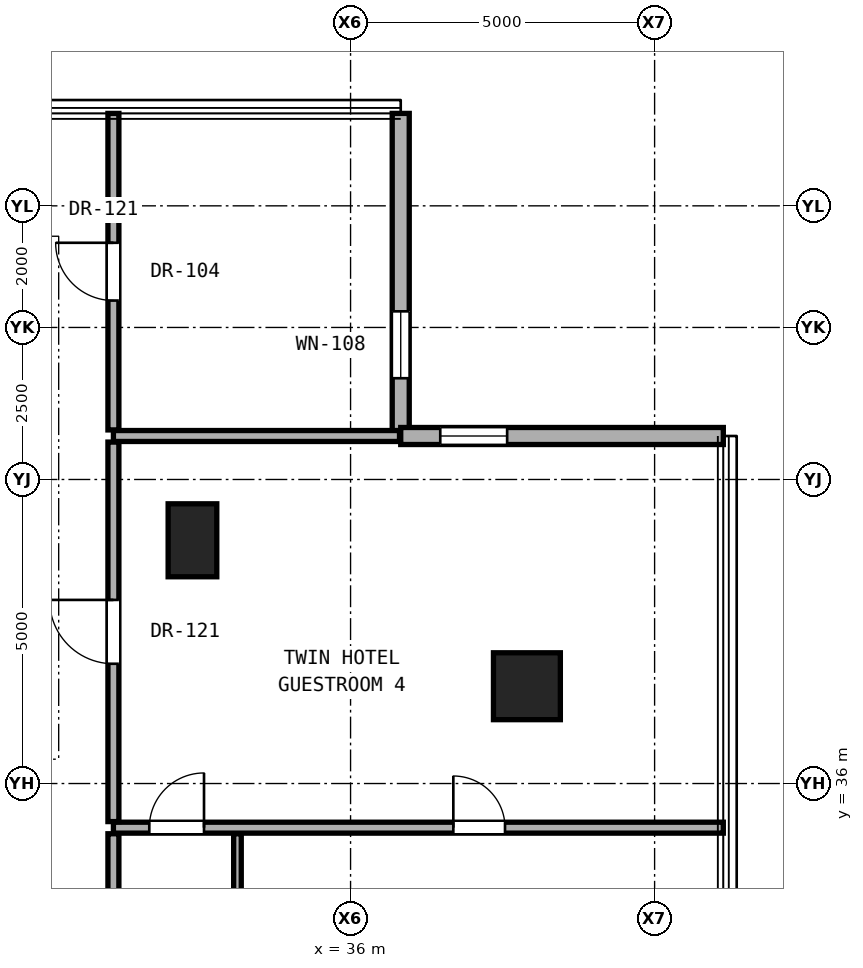
"""IFC4 building model, lengths in metres.
Left out: names, types, materials, properties, quantities, classifications, styles, units other than length and angle.
Written with IfcOpenShell. Run it as: python <this file> out.ifc"""

import sys

from ifc_helpers import new_model, si_unit, direction, frame, frame_2d, origin, origin_2d, place, context, subcontext, project, spatial, rectangle, hollow_rectangle, extrude, element, fill, save


model = new_model("IFC4")
c1 = context("Model", 3, precision=1e-05, world=origin(), true_north=direction((0.0, 1.0)))
c2 = subcontext(c1, "Body", "Model", "MODEL_VIEW")
j1 = project(units=[si_unit("LENGTHUNIT", "METRE"), si_unit("PLANEANGLEUNIT", "RADIAN")], contexts=[c1])
p1 = place(None, origin())
s1 = spatial("IfcSite", under=j1, at=p1, CompositionType="ELEMENT")
p2 = place(p1, origin())
s2 = spatial("IfcBuilding", under=s1, at=p2, CompositionType="ELEMENT")
p3 = place(p2, frame((0.0, 0.0, 104.9)))
s3 = spatial("IfcBuildingStorey", under=s2, at=p3, CompositionType="ELEMENT", Elevation=104.9)
p4 = place(p3, frame((38.9, 37.6, 0.0), z_axis=(0.0, 0.0, 1.0), x_axis=(1.0, 0.0, 0.0)))
e1 = element("IfcColumn", 1, at=p4, inside=s3, PredefinedType="COLUMN", context=c2, shape_type="SweptSolid", body=[
    extrude(hollow_rectangle(XDim=1.1, YDim=1.1, WallThickness=0.06, at=origin_2d()), origin(), (0.0, 0.0, 1.0), 3.3),
])
p5 = place(p3, frame((33.4, 40.0, 0.0), z_axis=(0.0, 0.0, 1.0), x_axis=(1.0, 0.0, 0.0)))
e2 = element("IfcColumn", 2, at=p5, inside=s3, PredefinedType="PILASTER", context=c2, shape_type="SweptSolid", body=[
    extrude(rectangle(XDim=0.8, YDim=1.2, at=origin_2d()), origin(), (0.0, 0.0, 1.0), 3.3),
])
p6 = place(p3, frame((36.825, 41.715, 0.0), z_axis=(0.0, 0.0, 1.0), x_axis=(0.0, 1.0, 0.0)))
e3 = element("IfcWall", 3, at=p6, inside=s3, PredefinedType="SOLIDWALL", context=c2, shape_type="SweptSolid", body=[
    extrude(rectangle(XDim=5.305, YDim=0.28, at=frame_2d((2.652, 0.0))), origin(), (0.0, 0.0, 1.0), 3.06),
])
p7 = place(p6, frame((0.95, 0.0, 0.85)))
e4 = element("IfcOpeningElement", 4, at=p7, cuts=e3, PredefinedType="OPENING", context=c2, shape_type="SweptSolid", body=[
    extrude(rectangle(XDim=1.1, YDim=2.0, at=frame_2d((0.55, 1.0))), frame((0.0, 0.15, 0.0), z_axis=(0.0, -1.0, 0.0), x_axis=(1.0, 0.0, 0.0)), (0.0, 0.0, 1.0), 0.3),
])
p8 = place(p3, frame((42.13, 41.715, 0.0), z_axis=(0.0, 0.0, 1.0), x_axis=(-1.0, 0.0, 0.0)))
e5 = element("IfcWall", 5, at=p8, inside=s3, PredefinedType="SOLIDWALL", context=c2, shape_type="SweptSolid", body=[
    extrude(rectangle(XDim=5.305, YDim=0.28, at=frame_2d((2.652, 0.0))), origin(), (0.0, 0.0, 1.0), 3.06),
])
p9 = place(p8, frame((3.555, 0.0, 0.85)))
e6 = element("IfcOpeningElement", 6, at=p9, cuts=e5, PredefinedType="OPENING", context=c2, shape_type="SweptSolid", body=[
    extrude(rectangle(XDim=1.1, YDim=2.0, at=frame_2d((0.55, 1.0))), frame((0.0, 0.15, 0.0), z_axis=(0.0, -1.0, 0.0), x_axis=(1.0, 0.0, 0.0)), (0.0, 0.0, 1.0), 0.3),
])
p10 = place(p3, frame((32.1, 35.274, 0.0), z_axis=(0.0, 0.0, 1.0), x_axis=(1.0, 0.0, 0.0)))
e7 = element("IfcWall", 7, at=p10, inside=s3, PredefinedType="PARTITIONING", context=c2, shape_type="SweptSolid", body=[
    extrude(rectangle(XDim=10.03, YDim=0.18, at=frame_2d((5.015, 0.0))), origin(), (0.0, 0.0, 1.0), 2.145),
])
p11 = place(p10, frame((5.59, 0.0, 0.0)))
e8 = element("IfcOpeningElement", 8, at=p11, cuts=e7, PredefinedType="OPENING", context=c2, shape_type="SweptSolid", body=[
    extrude(rectangle(XDim=0.85, YDim=2.01, at=frame_2d((0.425, 1.005))), frame((0.0, 0.1, 0.0), z_axis=(0.0, -1.0, 0.0), x_axis=(1.0, 0.0, 0.0)), (0.0, 0.0, 1.0), 0.2),
])
p12 = place(p10, frame((0.59, 0.0, 0.0)))
e9 = element("IfcOpeningElement", 9, at=p12, cuts=e7, PredefinedType="OPENING", context=c2, shape_type="SweptSolid", body=[
    extrude(rectangle(XDim=0.9, YDim=2.1, at=frame_2d((0.45, 1.05))), frame((0.0, 0.1, 0.0), z_axis=(0.0, -1.0, 0.0), x_axis=(1.0, 0.0, 0.0)), (0.0, 0.0, 1.0), 0.2),
])
p13 = place(p3, frame((32.1, 41.715, 0.0), z_axis=(0.0, 0.0, 1.0), x_axis=(1.0, 0.0, 0.0)))
e10 = element("IfcWall", 10, at=p13, inside=s3, PredefinedType="PARTITIONING", context=c2, shape_type="SweptSolid", body=[
    extrude(rectangle(XDim=4.705, YDim=0.18, at=frame_2d((2.353, 0.0))), origin(), (0.0, 0.0, 1.0), 3.08),
])
p14 = place(p3, frame((32.1, 33.074, 0.0), z_axis=(0.0, 0.0, 1.0), x_axis=(0.0, 1.0, 0.0)))
e11 = element("IfcWall", 11, at=p14, inside=s3, PredefinedType="PARTITIONING", context=c2, shape_type="SweptSolid", body=[
    extrude(rectangle(XDim=2.1, YDim=0.18, at=frame_2d((1.05, 0.0))), origin(), (0.0, 0.0, 1.0), 3.08),
])
p15 = place(p3, frame((32.1, 35.374, 0.0), z_axis=(0.0, 0.0, 1.0), x_axis=(0.0, 1.0, 0.0)))
e12 = element("IfcWall", 12, at=p15, inside=s3, PredefinedType="PARTITIONING", context=c2, shape_type="SweptSolid", body=[
    extrude(rectangle(XDim=6.241, YDim=0.18, at=frame_2d((3.121, 0.0))), origin(), (0.0, 0.0, 1.0), 2.456),
])
p16 = place(p15, frame((2.595, 0.0, 0.0)))
e13 = element("IfcOpeningElement", 13, at=p16, cuts=e12, PredefinedType="OPENING", context=c2, shape_type="SweptSolid", body=[
    extrude(rectangle(XDim=1.05, YDim=2.2, at=frame_2d((0.525, 1.1))), frame((0.0, 0.1, 0.0), z_axis=(0.0, -1.0, 0.0), x_axis=(1.0, 0.0, 0.0)), (0.0, 0.0, 1.0), 0.2),
])
p17 = place(p3, frame((32.1, 41.815, 0.0), z_axis=(0.0, 0.0, 1.0), x_axis=(0.0, 1.0, 0.0)))
e14 = element("IfcWall", 14, at=p17, inside=s3, PredefinedType="PARTITIONING", context=c2, shape_type="SweptSolid", body=[
    extrude(rectangle(XDim=5.205, YDim=0.18, at=frame_2d((2.603, 0.0))), origin(), (0.0, 0.0, 1.0), 3.08),
])
p18 = place(p17, frame((2.127, 0.0, 0.0)))
e15 = element("IfcOpeningElement", 15, at=p18, cuts=e14, PredefinedType="OPENING", context=c2, shape_type="SweptSolid", body=[
    extrude(rectangle(XDim=0.95, YDim=2.15, at=frame_2d((0.475, 1.075))), frame((0.0, 0.1, 0.0), z_axis=(0.0, -1.0, 0.0), x_axis=(1.0, 0.0, 0.0)), (0.0, 0.0, 1.0), 0.2),
])
p19 = place(p3, frame((34.14, 33.074, 0.0), z_axis=(0.0, 0.0, 1.0), x_axis=(0.0, 1.0, 0.0)))
e16 = element("IfcWall", 16, at=p19, inside=s3, PredefinedType="PARTITIONING", context=c2, shape_type="SweptSolid", body=[
    extrude(rectangle(XDim=2.1, YDim=0.125, at=frame_2d((1.05, 0.0))), origin(), (0.0, 0.0, 1.0), 3.08),
])
p20 = place(p7, origin())
e17 = element("IfcWindow", 17, at=p20, inside=s3, PartitioningType="SINGLE_PANEL", PredefinedType="WINDOW", context=c2, shape_type="SweptSolid", body=[
    extrude(rectangle(XDim=1.1, YDim=2.0, at=frame_2d((0.55, 1.0))), frame((0.0, 0.03, 0.0), z_axis=(0.0, -1.0, 0.0), x_axis=(1.0, 0.0, 0.0)), (0.0, 0.0, 1.0), 0.06),
])
fill(e4, e17)
p21 = place(p9, origin())
e18 = element("IfcWindow", 18, at=p21, inside=s3, PartitioningType="SINGLE_PANEL", PredefinedType="WINDOW", context=c2, shape_type="SweptSolid", body=[
    extrude(rectangle(XDim=1.1, YDim=2.0, at=frame_2d((0.55, 1.0))), frame((0.0, 0.03, 0.0), z_axis=(0.0, -1.0, 0.0), x_axis=(1.0, 0.0, 0.0)), (0.0, 0.0, 1.0), 0.06),
])
fill(e6, e18)
p22 = place(p16, origin())
e19 = element("IfcDoor", 19, at=p22, inside=s3, OperationType="SINGLE_SWING_RIGHT", PredefinedType="DOOR", context=c2, shape_type="SweptSolid", body=[
    extrude(rectangle(XDim=1.05, YDim=2.2, at=frame_2d((0.525, 1.1))), frame((0.0, 0.025, 0.0), z_axis=(0.0, -1.0, 0.0), x_axis=(1.0, 0.0, 0.0)), (0.0, 0.0, 1.0), 0.05),
])
fill(e13, e19)
p23 = place(p11, origin())
e20 = element("IfcDoor", 20, at=p23, inside=s3, OperationType="SINGLE_SWING_LEFT", PredefinedType="DOOR", context=c2, shape_type="SweptSolid", body=[
    extrude(rectangle(XDim=0.85, YDim=2.01, at=frame_2d((0.425, 1.005))), frame((0.0, 0.025, 0.0), z_axis=(0.0, -1.0, 0.0), x_axis=(1.0, 0.0, 0.0)), (0.0, 0.0, 1.0), 0.05),
])
fill(e8, e20)
p24 = place(p12, origin())
e21 = element("IfcDoor", 21, at=p24, inside=s3, OperationType="SINGLE_SWING_RIGHT", PredefinedType="DOOR", context=c2, shape_type="SweptSolid", body=[
    extrude(rectangle(XDim=0.9, YDim=2.1, at=frame_2d((0.45, 1.05))), frame((0.0, 0.025, 0.0), z_axis=(0.0, -1.0, 0.0), x_axis=(1.0, 0.0, 0.0)), (0.0, 0.0, 1.0), 0.05),
])
fill(e9, e21)
p25 = place(p18, origin())
e22 = element("IfcDoor", 22, at=p25, inside=s3, OperationType="SINGLE_SWING_RIGHT", PredefinedType="DOOR", context=c2, shape_type="SweptSolid", body=[
    extrude(rectangle(XDim=0.95, YDim=2.15, at=frame_2d((0.475, 1.075))), frame((0.0, 0.025, 0.0), z_axis=(0.0, -1.0, 0.0), x_axis=(1.0, 0.0, 0.0)), (0.0, 0.0, 1.0), 0.05),
])
fill(e15, e22)
save(model, sys.argv[1])
